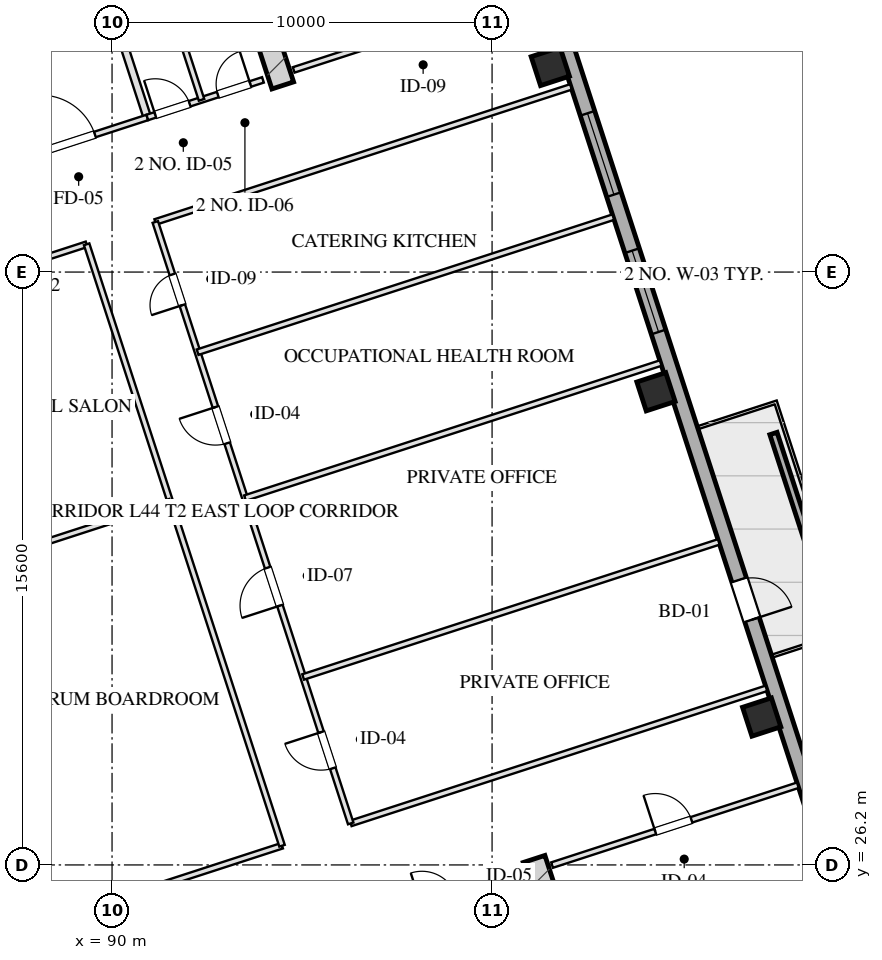
"""IFC4 building model, lengths in metres.
Left out: names, types, materials, properties, quantities, classifications, styles, units other than length and angle.
Written with IfcOpenShell. Run it as: python <this file> out.ifc"""

import sys

from ifc_helpers import new_model, si_unit, direction, frame, frame_2d, origin, origin_2d, place, context, subcontext, project, spatial, rectangle, hollow_rectangle, extrude, element, fill, save


model = new_model("IFC4")
c1 = context("Model", 3, precision=1e-05, world=origin(), true_north=direction((0.0, 1.0)))
c2 = subcontext(c1, "Body", "Model", "MODEL_VIEW")
j1 = project(units=[si_unit("LENGTHUNIT", "METRE"), si_unit("PLANEANGLEUNIT", "RADIAN")], contexts=[c1])
p1 = place(None, origin())
s1 = spatial("IfcSite", under=j1, at=p1, CompositionType="ELEMENT")
p2 = place(p1, origin())
s2 = spatial("IfcBuilding", under=s1, at=p2, CompositionType="ELEMENT")
p3 = place(p2, frame((0.0, 0.0, 166.75)))
s3 = spatial("IfcBuildingStorey", under=s2, at=p3, CompositionType="ELEMENT", Elevation=166.75)
for number, where, z_axis, x_axis in (
    (1, (101.105, 26.358, 0.0), (0.0, 0.0, 1.0), (0.309, -0.951, 0.0)),
    (2, (94.492, 46.71, 0.0), (0.0, 0.0, 1.0), (-0.309, 0.951, 0.0)),
):
    element("IfcWall", number, at=place(p3, frame(where, z_axis=z_axis, x_axis=x_axis)), inside=s3, PredefinedType="SHEAR", context=c2, shape_type="SweptSolid", body=[
        extrude(rectangle(XDim=9.48, YDim=0.6, at=frame_2d((4.74, 0.0))), origin(), (0.0, 0.0, 1.0), 3.45),
    ])
for number, where, z_axis, x_axis in (
    (3, (107.094, 30.091, 0.0), (0.0, 0.0, 1.0), (0.951, 0.309, 0.0)),
    (4, (104.313, 38.651, 0.0), (0.0, 0.0, 1.0), (0.951, 0.309, 0.0)),
    (5, (101.532, 47.21, 0.0), (0.0, 0.0, 1.0), (0.951, 0.309, 0.0)),
):
    element("IfcColumn", number, at=place(p3, frame(where, z_axis=z_axis, x_axis=x_axis)), inside=s3, PredefinedType="COLUMN", context=c2, shape_type="SweptSolid", body=[
        extrude(hollow_rectangle(XDim=0.8, YDim=0.8, WallThickness=0.028, at=origin_2d()), origin(), (0.0, 0.0, 1.0), 3.451),
    ])
p4 = place(p3, frame((98.224, 59.173, 0.0), z_axis=(0.0, 0.0, 1.0), x_axis=(0.309014228706, -0.951057414911, 0.0)))
e6 = element("IfcWall", 6, at=p4, inside=s3, PredefinedType="SOLIDWALL", context=c2, shape_type="SweptSolid", body=[
    extrude(rectangle(XDim=42.8, YDim=0.4, at=frame_2d((21.4, 0.0))), origin(), (0.0, 0.0, 1.0), 2.61),
])
p5 = place(p4, frame((17.675, 0.0, 0.75)))
e7 = element("IfcOpeningElement", 7, at=p5, cuts=e6, PredefinedType="OPENING", context=c2, shape_type="SweptSolid", body=[
    extrude(rectangle(XDim=2.25, YDim=1.46, at=frame_2d((1.125, 0.73))), frame((0.0, 0.21, 0.0), z_axis=(0.0, -1.0, 0.0), x_axis=(1.0, 0.0, 0.0)), (0.0, 0.0, 1.0), 0.42),
])
p6 = place(p4, frame((13.875, 0.0, 0.75)))
e8 = element("IfcOpeningElement", 8, at=p6, cuts=e6, PredefinedType="OPENING", context=c2, shape_type="SweptSolid", body=[
    extrude(rectangle(XDim=2.25, YDim=1.46, at=frame_2d((1.125, 0.73))), frame((0.0, 0.21, 0.0), z_axis=(0.0, -1.0, 0.0), x_axis=(1.0, 0.0, 0.0)), (0.0, 0.0, 1.0), 0.42),
])
p7 = place(p4, frame((26.784, 0.0, 0.0)))
e9 = element("IfcOpeningElement", 9, at=p7, cuts=e6, PredefinedType="OPENING", context=c2, shape_type="SweptSolid", body=[
    extrude(rectangle(XDim=1.1, YDim=2.15, at=frame_2d((0.55, 1.075))), frame((0.0, 0.21, 0.0), z_axis=(0.0, -1.0, 0.0), x_axis=(1.0, 0.0, 0.0)), (0.0, 0.0, 1.0), 0.42),
])
p8 = place(p3, frame((108.887, 32.987, 0.0), z_axis=(0.0, 0.0, 1.0), x_axis=(-0.30900096172, 0.951061725471, 0.0)))
e10 = element("IfcWall", 10, at=p8, inside=s3, PredefinedType="PARAPET", context=c2, shape_type="SweptSolid", body=[
    extrude(rectangle(XDim=4.8, YDim=0.2, at=frame_2d((2.4, 0.0))), origin(), (0.0, 0.0, 1.0), 0.75),
])
p9 = place(p3, frame((97.727, 24.944, 0.0), z_axis=(0.0, 0.0, 1.0), x_axis=(0.951036872128, 0.309077446369, 0.0)))
e11 = element("IfcWall", 11, at=p9, inside=s3, PredefinedType="PARTITIONING", context=c2, shape_type="SweptSolid", body=[
    extrude(rectangle(XDim=3.2, YDim=0.15, at=frame_2d((1.6, 0.0))), origin(), (0.0, 0.0, 1.0), 3.175),
])
p10 = place(p9, frame((0.45, 0.0, 0.0)))
e12 = element("IfcOpeningElement", 12, at=p10, cuts=e11, PredefinedType="OPENING", context=c2, shape_type="SweptSolid", body=[
    extrude(rectangle(XDim=0.95, YDim=2.05, at=frame_2d((0.475, 1.025))), frame((0.0, 0.085, 0.0), z_axis=(0.0, -1.0, 0.0), x_axis=(1.0, 0.0, 0.0)), (0.0, 0.0, 1.0), 0.17),
])
p11 = place(p3, frame((90.928, 45.868, 0.0), z_axis=(0.0, 0.0, 1.0), x_axis=(-0.309042196757, 0.951048327176, 0.0)))
e13 = element("IfcWall", 13, at=p11, inside=s3, PredefinedType="PARTITIONING", context=c2, shape_type="SweptSolid", body=[
    extrude(rectangle(XDim=8.43, YDim=0.2, at=frame_2d((4.215, 0.0))), origin(), (0.0, 0.0, 1.0), 3.175),
])
p12 = place(p3, frame((86.743, 44.508, 0.0), z_axis=(0.0, 0.0, 1.0), x_axis=(0.951063829732, 0.308994485023, 0.0)))
e14 = element("IfcWall", 14, at=p12, inside=s3, PredefinedType="PARTITIONING", context=c2, shape_type="SweptSolid", body=[
    extrude(rectangle(XDim=4.4, YDim=0.15, at=frame_2d((2.2, 0.0))), origin(), (0.0, 0.0, 1.0), 3.175),
])
p13 = place(p12, frame((1.45, 0.0, 0.0)))
e15 = element("IfcOpeningElement", 15, at=p13, cuts=e14, PredefinedType="OPENING", context=c2, shape_type="SweptSolid", body=[
    extrude(rectangle(XDim=1.5, YDim=2.05, at=frame_2d((0.75, 1.025))), frame((0.0, 0.085, 0.0), z_axis=(0.0, -1.0, 0.0), x_axis=(1.0, 0.0, 0.0)), (0.0, 0.0, 1.0), 0.17),
])
p14 = place(p3, frame((85.718, 47.666, 0.0), z_axis=(0.0, 0.0, 1.0), x_axis=(0.951058531764, 0.30901079133, 0.0)))
e16 = element("IfcWall", 16, at=p14, inside=s3, PredefinedType="PARTITIONING", context=c2, shape_type="SweptSolid", body=[
    extrude(rectangle(XDim=4.4, YDim=0.2, at=frame_2d((2.2, 0.0))), origin(), (0.0, 0.0, 1.0), 3.175),
])
p15 = place(p14, frame((0.45, 0.0, 0.0)))
e17 = element("IfcOpeningElement", 17, at=p15, cuts=e16, PredefinedType="OPENING", context=c2, shape_type="SweptSolid", body=[
    extrude(rectangle(XDim=1.1, YDim=2.05, at=frame_2d((0.55, 1.025))), frame((0.0, 0.11, 0.0), z_axis=(0.0, -1.0, 0.0), x_axis=(1.0, 0.0, 0.0)), (0.0, 0.0, 1.0), 0.22),
])
p16 = place(p14, frame((2.55, 0.0, 0.0)))
e18 = element("IfcOpeningElement", 18, at=p16, cuts=e16, PredefinedType="OPENING", context=c2, shape_type="SweptSolid", body=[
    extrude(rectangle(XDim=1.1, YDim=2.05, at=frame_2d((0.55, 1.025))), frame((0.0, 0.11, 0.0), z_axis=(0.0, -1.0, 0.0), x_axis=(1.0, 0.0, 0.0)), (0.0, 0.0, 1.0), 0.22),
])
p17 = place(p3, frame((90.928, 45.868, 0.0), z_axis=(0.0, 0.0, 1.0), x_axis=(0.951059297078, 0.309008435874, 0.0)))
e19 = element("IfcWall", 19, at=p17, inside=s3, PredefinedType="PARTITIONING", context=c2, shape_type="SweptSolid", body=[
    extrude(rectangle(XDim=3.2, YDim=0.15, at=frame_2d((1.6, 0.0))), origin(), (0.0, 0.0, 1.0), 3.175),
])
p18 = place(p17, frame((0.22, 0.0, 0.0)))
e20 = element("IfcOpeningElement", 20, at=p18, cuts=e19, PredefinedType="OPENING", context=c2, shape_type="SweptSolid", body=[
    extrude(rectangle(XDim=0.95, YDim=2.05, at=frame_2d((0.475, 1.025))), frame((0.0, 0.085, 0.0), z_axis=(0.0, -1.0, 0.0), x_axis=(1.0, 0.0, 0.0)), (0.0, 0.0, 1.0), 0.17),
])
p19 = place(p17, frame((1.95, 0.0, 0.0)))
e21 = element("IfcOpeningElement", 21, at=p19, cuts=e19, PredefinedType="OPENING", context=c2, shape_type="SweptSolid", body=[
    extrude(rectangle(XDim=0.9, YDim=2.05, at=frame_2d((0.45, 1.025))), frame((0.0, 0.085, 0.0), z_axis=(0.0, -1.0, 0.0), x_axis=(1.0, 0.0, 0.0)), (0.0, 0.0, 1.0), 0.17),
])
p20 = place(p3, frame((92.355, 46.331, 0.0), z_axis=(0.0, 0.0, 1.0), x_axis=(-0.309007490203, 0.951059604335, 0.0)))
e22 = element("IfcWall", 22, at=p20, inside=s3, PredefinedType="PARTITIONING", context=c2, shape_type="SweptSolid", body=[
    extrude(rectangle(XDim=8.43, YDim=0.15, at=frame_2d((4.215, 0.0))), origin(), (0.0, 0.0, 1.0), 3.175),
])
p21 = place(p20, frame((2.55, 0.0, 0.0)))
e23 = element("IfcOpeningElement", 23, at=p21, cuts=e22, PredefinedType="OPENING", context=c2, shape_type="SweptSolid", body=[
    extrude(rectangle(XDim=0.95, YDim=2.05, at=frame_2d((0.475, 1.025))), frame((0.0, 0.085, 0.0), z_axis=(0.0, -1.0, 0.0), x_axis=(1.0, 0.0, 0.0)), (0.0, 0.0, 1.0), 0.17),
])
p22 = place(p20, frame((5.6, 0.0, 0.0)))
e24 = element("IfcOpeningElement", 24, at=p22, cuts=e22, PredefinedType="OPENING", context=c2, shape_type="SweptSolid", body=[
    extrude(rectangle(XDim=0.9, YDim=2.05, at=frame_2d((0.45, 1.025))), frame((0.0, 0.085, 0.0), z_axis=(0.0, -1.0, 0.0), x_axis=(1.0, 0.0, 0.0)), (0.0, 0.0, 1.0), 0.17),
])
p23 = place(p3, frame((101.578, 26.196, 0.0), z_axis=(0.0, 0.0, 1.0), x_axis=(0.951064934653, 0.308991084134, 0.0)))
e25 = element("IfcWall", 25, at=p23, inside=s3, PredefinedType="PARTITIONING", context=c2, shape_type="SweptSolid", body=[
    extrude(rectangle(XDim=6.8, YDim=0.15, at=frame_2d((3.4, 0.0))), origin(), (0.0, 0.0, 1.0), 3.175),
])
p24 = place(p23, frame((2.856, 0.0, 0.0)))
e26 = element("IfcOpeningElement", 26, at=p24, cuts=e25, PredefinedType="OPENING", context=c2, shape_type="SweptSolid", body=[
    extrude(rectangle(XDim=1.0, YDim=2.05, at=frame_2d((0.5, 1.025))), frame((0.0, 0.085, 0.0), z_axis=(0.0, -1.0, 0.0), x_axis=(1.0, 0.0, 0.0)), (0.0, 0.0, 1.0), 0.17),
])
p25 = place(p3, frame((94.78, 47.119, 0.0), z_axis=(0.0, 0.0, 1.0), x_axis=(0.951057811516, 0.309013008068, 0.0)))
e27 = element("IfcWall", 27, at=p25, inside=s3, PredefinedType="PARTITIONING", context=c2, shape_type="SweptSolid", body=[
    extrude(rectangle(XDim=6.8, YDim=0.15, at=frame_2d((3.4, 0.0))), origin(), (0.0, 0.0, 1.0), 3.175),
])
p26 = place(p25, frame((2.856, 0.0, 0.0)))
e28 = element("IfcOpeningElement", 28, at=p26, cuts=e27, PredefinedType="OPENING", context=c2, shape_type="SweptSolid", body=[
    extrude(rectangle(XDim=0.85, YDim=2.05, at=frame_2d((0.425, 1.025))), frame((0.0, 0.085, 0.0), z_axis=(0.0, -1.0, 0.0), x_axis=(1.0, 0.0, 0.0)), (0.0, 0.0, 1.0), 0.17),
])
p27 = place(p3, frame((86.294, 24.048, 0.0), z_axis=(0.0, 0.0, 1.0), x_axis=(0.951052008164, 0.309030868631, 0.0)))
e29 = element("IfcWall", 29, at=p27, inside=s3, PredefinedType="PARTITIONING", context=c2, shape_type="SweptSolid", body=[
    extrude(rectangle(XDim=8.6, YDim=0.15, at=frame_2d((4.3, 0.0))), origin(), (0.0, 0.0, 1.0), 3.175),
])
p28 = place(p3, frame((96.28, 27.292, 0.0), z_axis=(0.0, 0.0, 1.0), x_axis=(0.951056999652, 0.309015506751, 0.0)))
e30 = element("IfcWall", 30, at=p28, inside=s3, PredefinedType="PARTITIONING", context=c2, shape_type="SweptSolid", body=[
    extrude(rectangle(XDim=11.5, YDim=0.15, at=frame_2d((5.75, 0.0))), origin(), (0.0, 0.0, 1.0), 3.175),
])
p29 = place(p3, frame((81.152, 39.873, 0.0), z_axis=(0.0, 0.0, 1.0), x_axis=(0.951057640494, 0.309013534425, 0.0)))
e31 = element("IfcWall", 31, at=p29, inside=s3, PredefinedType="PARTITIONING", context=c2, shape_type="SweptSolid", body=[
    extrude(rectangle(XDim=8.6, YDim=0.15, at=frame_2d((4.3, 0.0))), origin(), (0.0, 0.0, 1.0), 3.175),
])
p30 = place(p3, frame((91.138, 43.118, 0.0), z_axis=(0.0, 0.0, 1.0), x_axis=(0.951054972381, 0.309021746015, 0.0)))
e32 = element("IfcWall", 32, at=p30, inside=s3, PredefinedType="PARTITIONING", context=c2, shape_type="SweptSolid", body=[
    extrude(rectangle(XDim=11.5, YDim=0.15, at=frame_2d((5.75, 0.0))), origin(), (0.0, 0.0, 1.0), 3.175),
])
p31 = place(p3, frame((94.473, 26.705, 0.0), z_axis=(0.0, 0.0, 1.0), x_axis=(-0.309022042254, 0.951054876125, 0.0)))
e33 = element("IfcWall", 33, at=p31, inside=s3, PredefinedType="PARTITIONING", context=c2, shape_type="SweptSolid", body=[
    extrude(rectangle(XDim=16.64, YDim=0.15, at=frame_2d((8.32, 0.0))), origin(), (0.0, 0.0, 1.0), 3.175),
])
p32 = place(p3, frame((96.28, 27.292, 0.0), z_axis=(0.0, 0.0, 1.0), x_axis=(-0.309008771245, 0.951059188113, 0.0)))
e34 = element("IfcWall", 34, at=p32, inside=s3, PredefinedType="PARTITIONING", context=c2, shape_type="SweptSolid", body=[
    extrude(rectangle(XDim=16.64, YDim=0.15, at=frame_2d((8.32, 0.0))), origin(), (0.0, 0.0, 1.0), 3.175),
])
p33 = place(p32, frame((1.526, 0.0, 0.0)))
e35 = element("IfcOpeningElement", 35, at=p33, cuts=e34, PredefinedType="OPENING", context=c2, shape_type="SweptSolid", body=[
    extrude(rectangle(XDim=1.0, YDim=2.05, at=frame_2d((0.5, 1.025))), frame((0.0, 0.085, 0.0), z_axis=(0.0, -1.0, 0.0), x_axis=(1.0, 0.0, 0.0)), (0.0, 0.0, 1.0), 0.17),
])
p34 = place(p32, frame((6.026, 0.0, 0.0)))
e36 = element("IfcOpeningElement", 36, at=p34, cuts=e34, PredefinedType="OPENING", context=c2, shape_type="SweptSolid", body=[
    extrude(rectangle(XDim=1.05, YDim=2.05, at=frame_2d((0.525, 1.025))), frame((0.0, 0.085, 0.0), z_axis=(0.0, -1.0, 0.0), x_axis=(1.0, 0.0, 0.0)), (0.0, 0.0, 1.0), 0.17),
])
p35 = place(p32, frame((10.519, 0.0, 0.0)))
e37 = element("IfcOpeningElement", 37, at=p35, cuts=e34, PredefinedType="OPENING", context=c2, shape_type="SweptSolid", body=[
    extrude(rectangle(XDim=1.0, YDim=2.05, at=frame_2d((0.5, 1.025))), frame((0.0, 0.085, 0.0), z_axis=(0.0, -1.0, 0.0), x_axis=(1.0, 0.0, 0.0)), (0.0, 0.0, 1.0), 0.17),
])
p36 = place(p32, frame((14.338, 0.0, 0.0)))
e38 = element("IfcOpeningElement", 38, at=p36, cuts=e34, PredefinedType="OPENING", context=c2, shape_type="SweptSolid", body=[
    extrude(rectangle(XDim=0.85, YDim=2.05, at=frame_2d((0.425, 1.025))), frame((0.0, 0.085, 0.0), z_axis=(0.0, -1.0, 0.0), x_axis=(1.0, 0.0, 0.0)), (0.0, 0.0, 1.0), 0.17),
])
p37 = place(p3, frame((83.352, 33.102, 0.0), z_axis=(0.0, 0.0, 1.0), x_axis=(0.951057640494, 0.309013534425, 0.0)))
e39 = element("IfcWall", 39, at=p37, inside=s3, PredefinedType="PARTITIONING", context=c2, shape_type="SweptSolid", body=[
    extrude(rectangle(XDim=8.6, YDim=0.15, at=frame_2d((4.3, 0.0))), origin(), (0.0, 0.0, 1.0), 3.175),
])
p38 = place(p3, frame((95.028, 31.146, 0.0), z_axis=(0.0, 0.0, 1.0), x_axis=(0.951056999652, 0.309015506751, 0.0)))
e40 = element("IfcWall", 40, at=p38, inside=s3, PredefinedType="PARTITIONING", context=c2, shape_type="SweptSolid", body=[
    extrude(rectangle(XDim=11.5, YDim=0.15, at=frame_2d((5.75, 0.0))), origin(), (0.0, 0.0, 1.0), 3.175),
])
p39 = place(p3, frame((93.499, 35.852, 0.0), z_axis=(0.0, 0.0, 1.0), x_axis=(0.951054972381, 0.309021746015, 0.0)))
e41 = element("IfcWall", 41, at=p39, inside=s3, PredefinedType="PARTITIONING", context=c2, shape_type="SweptSolid", body=[
    extrude(rectangle(XDim=11.5, YDim=0.15, at=frame_2d((5.75, 0.0))), origin(), (0.0, 0.0, 1.0), 3.175),
])
p40 = place(p3, frame((92.251, 39.691, 0.0), z_axis=(0.0, 0.0, 1.0), x_axis=(0.951063238644, 0.308996304347, 0.0)))
e42 = element("IfcWall", 42, at=p40, inside=s3, PredefinedType="PARTITIONING", context=c2, shape_type="SweptSolid", body=[
    extrude(rectangle(XDim=11.5, YDim=0.15, at=frame_2d((5.75, 0.0))), origin(), (0.0, 0.0, 1.0), 3.175),
])
p41 = place(p5, origin())
e43 = element("IfcWindow", 43, at=p41, inside=s3, PartitioningType="TRIPLE_PANEL_VERTICAL", PredefinedType="WINDOW", context=c2, shape_type="SweptSolid", body=[
    extrude(rectangle(XDim=2.25, YDim=1.46, at=frame_2d((1.125, 0.73))), frame((0.0, 0.03, 0.0), z_axis=(0.0, -1.0, 0.0), x_axis=(1.0, 0.0, 0.0)), (0.0, 0.0, 1.0), 0.06),
])
fill(e7, e43)
p42 = place(p6, origin())
e44 = element("IfcWindow", 44, at=p42, inside=s3, PartitioningType="TRIPLE_PANEL_VERTICAL", PredefinedType="WINDOW", context=c2, shape_type="SweptSolid", body=[
    extrude(rectangle(XDim=2.25, YDim=1.46, at=frame_2d((1.125, 0.73))), frame((0.0, 0.03, 0.0), z_axis=(0.0, -1.0, 0.0), x_axis=(1.0, 0.0, 0.0)), (0.0, 0.0, 1.0), 0.06),
])
fill(e8, e44)
p43 = place(p7, origin())
e45 = element("IfcDoor", 45, at=p43, inside=s3, OperationType="SINGLE_SWING_RIGHT", PredefinedType="DOOR", context=c2, shape_type="SweptSolid", body=[
    extrude(rectangle(XDim=1.1, YDim=2.15, at=frame_2d((0.55, 1.075))), frame((0.0, 0.025, 0.0), z_axis=(0.0, -1.0, 0.0), x_axis=(1.0, 0.0, 0.0)), (0.0, 0.0, 1.0), 0.05),
])
fill(e9, e45)
p44 = place(p13, origin())
e46 = element("IfcDoor", 46, at=p44, inside=s3, OperationType="SINGLE_SWING_LEFT", PredefinedType="DOOR", context=c2, shape_type="SweptSolid", body=[
    extrude(rectangle(XDim=1.5, YDim=2.05, at=frame_2d((0.75, 1.025))), frame((0.0, 0.025, 0.0), z_axis=(0.0, -1.0, 0.0), x_axis=(1.0, 0.0, 0.0)), (0.0, 0.0, 1.0), 0.05),
])
fill(e15, e46)
p45 = place(p18, origin())
e47 = element("IfcDoor", 47, at=p45, inside=s3, OperationType="SINGLE_SWING_LEFT", PredefinedType="DOOR", context=c2, shape_type="SweptSolid", body=[
    extrude(rectangle(XDim=0.95, YDim=2.05, at=frame_2d((0.475, 1.025))), frame((0.0, 0.025, 0.0), z_axis=(0.0, -1.0, 0.0), x_axis=(1.0, 0.0, 0.0)), (0.0, 0.0, 1.0), 0.05),
])
fill(e20, e47)
p46 = place(p19, origin())
e48 = element("IfcDoor", 48, at=p46, inside=s3, OperationType="SINGLE_SWING_RIGHT", PredefinedType="DOOR", context=c2, shape_type="SweptSolid", body=[
    extrude(rectangle(XDim=0.9, YDim=2.05, at=frame_2d((0.45, 1.025))), frame((0.0, 0.025, 0.0), z_axis=(0.0, -1.0, 0.0), x_axis=(1.0, 0.0, 0.0)), (0.0, 0.0, 1.0), 0.05),
])
fill(e21, e48)
p47 = place(p24, origin())
e49 = element("IfcDoor", 49, at=p47, inside=s3, OperationType="SINGLE_SWING_LEFT", PredefinedType="DOOR", context=c2, shape_type="SweptSolid", body=[
    extrude(rectangle(XDim=1.0, YDim=2.05, at=frame_2d((0.5, 1.025))), frame((0.0, 0.025, 0.0), z_axis=(0.0, -1.0, 0.0), x_axis=(1.0, 0.0, 0.0)), (0.0, 0.0, 1.0), 0.05),
])
fill(e26, e49)
p48 = place(p33, origin())
e50 = element("IfcDoor", 50, at=p48, inside=s3, OperationType="SINGLE_SWING_RIGHT", PredefinedType="DOOR", context=c2, shape_type="SweptSolid", body=[
    extrude(rectangle(XDim=1.0, YDim=2.05, at=frame_2d((0.5, 1.025))), frame((0.0, 0.025, 0.0), z_axis=(0.0, -1.0, 0.0), x_axis=(1.0, 0.0, 0.0)), (0.0, 0.0, 1.0), 0.05),
])
fill(e35, e50)
p49 = place(p34, origin())
e51 = element("IfcDoor", 51, at=p49, inside=s3, OperationType="SINGLE_SWING_LEFT", PredefinedType="DOOR", context=c2, shape_type="SweptSolid", body=[
    extrude(rectangle(XDim=1.05, YDim=2.05, at=frame_2d((0.525, 1.025))), frame((0.0, 0.025, 0.0), z_axis=(0.0, -1.0, 0.0), x_axis=(1.0, 0.0, 0.0)), (0.0, 0.0, 1.0), 0.05),
])
fill(e36, e51)
p50 = place(p35, origin())
e52 = element("IfcDoor", 52, at=p50, inside=s3, OperationType="SINGLE_SWING_RIGHT", PredefinedType="DOOR", context=c2, shape_type="SweptSolid", body=[
    extrude(rectangle(XDim=1.0, YDim=2.05, at=frame_2d((0.5, 1.025))), frame((0.0, 0.025, 0.0), z_axis=(0.0, -1.0, 0.0), x_axis=(1.0, 0.0, 0.0)), (0.0, 0.0, 1.0), 0.05),
])
fill(e37, e52)
p51 = place(p36, origin())
e53 = element("IfcDoor", 53, at=p51, inside=s3, OperationType="SINGLE_SWING_LEFT", PredefinedType="DOOR", context=c2, shape_type="SweptSolid", body=[
    extrude(rectangle(XDim=0.85, YDim=2.05, at=frame_2d((0.425, 1.025))), frame((0.0, 0.025, 0.0), z_axis=(0.0, -1.0, 0.0), x_axis=(1.0, 0.0, 0.0)), (0.0, 0.0, 1.0), 0.05),
])
fill(e38, e53)
save(model, sys.argv[1])
